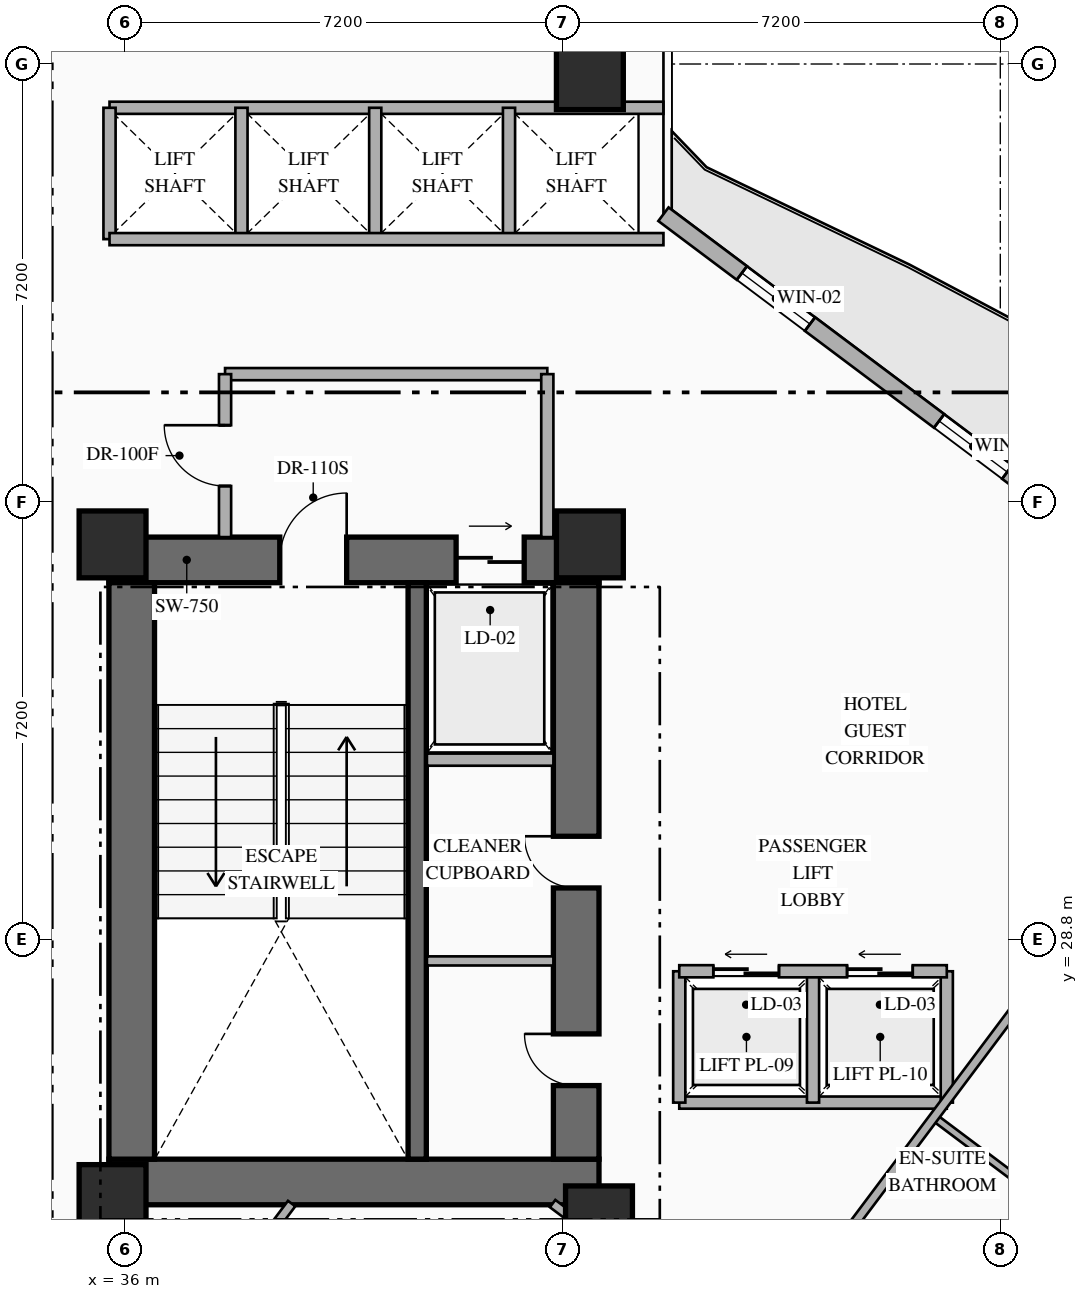
"""IFC4 building model, lengths in metres.
Left out: names, types, materials, properties, quantities, classifications, styles, units other than length and angle.
Written with IfcOpenShell. Run it as: python <this file> out.ifc"""

import sys

from ifc_helpers import new_model, si_unit, direction, frame, frame_2d, origin, origin_2d, place, context, subcontext, project, spatial, rectangle, extrude, element, fill, save


model = new_model("IFC4")
c1 = context("Model", 3, precision=1e-05, world=origin(), true_north=direction((0.0, 1.0)))
c2 = subcontext(c1, "Body", "Model", "MODEL_VIEW")
j1 = project(units=[si_unit("LENGTHUNIT", "METRE"), si_unit("PLANEANGLEUNIT", "RADIAN")], contexts=[c1])
p1 = place(None, origin())
s1 = spatial("IfcSite", under=j1, at=p1, CompositionType="ELEMENT")
p2 = place(p1, origin())
s2 = spatial("IfcBuilding", under=s1, at=p2, CompositionType="ELEMENT")
p3 = place(p2, frame((0.0, 0.0, 77.95)))
s3 = spatial("IfcBuildingStorey", under=s2, at=p3, CompositionType="ELEMENT", Elevation=77.95)
p4 = place(p3, frame((35.74, 24.815, 0.0), z_axis=(0.0, 0.0, 1.0), x_axis=(1.0, 0.0, 0.0)))
e1 = element("IfcWall", 1, at=p4, inside=s3, PredefinedType="SHEAR", context=c2, shape_type="SweptSolid", body=[
    extrude(rectangle(XDim=8.06, YDim=0.75, at=frame_2d((4.03, 0.0))), origin(), (0.0, 0.0, 1.0), 3.35),
])
p5 = place(p3, frame((35.74, 35.045, 0.0), z_axis=(0.0, 0.0, 1.0), x_axis=(1.0, 0.0, 0.0)))
e2 = element("IfcWall", 2, at=p5, inside=s3, PredefinedType="SHEAR", context=c2, shape_type="SweptSolid", body=[
    extrude(rectangle(XDim=8.06, YDim=0.75, at=frame_2d((4.03, 0.0))), origin(), (0.0, 0.0, 1.0), 3.35),
])
p6 = place(p5, frame((2.81, 0.0, 0.0)))
e3 = element("IfcOpeningElement", 3, at=p6, cuts=e2, PredefinedType="OPENING", context=c2, shape_type="SweptSolid", body=[
    extrude(rectangle(XDim=1.1, YDim=2.2, at=frame_2d((0.55, 1.1))), frame((0.0, 0.385, 0.0), z_axis=(0.0, -1.0, 0.0), x_axis=(1.0, 0.0, 0.0)), (0.0, 0.0, 1.0), 0.77),
])
p7 = place(p5, frame((5.71, 0.0, 0.0)))
e4 = element("IfcOpeningElement", 4, at=p7, cuts=e2, PredefinedType="OPENING", context=c2, shape_type="SweptSolid", body=[
    extrude(rectangle(XDim=1.12, YDim=2.15, at=frame_2d((0.56, 1.075))), frame((0.0, 0.385, 0.0), z_axis=(0.0, -1.0, 0.0), x_axis=(1.0, 0.0, 0.0)), (0.0, 0.0, 1.0), 0.77),
])
p8 = place(p3, frame((36.115, 25.19, 0.0), z_axis=(0.0, 0.0, 1.0), x_axis=(0.0, 1.0, 0.0)))
e5 = element("IfcWall", 5, at=p8, inside=s3, PredefinedType="SHEAR", context=c2, shape_type="SweptSolid", body=[
    extrude(rectangle(XDim=9.48, YDim=0.75, at=frame_2d((4.74, 0.0))), origin(), (0.0, 0.0, 1.0), 3.35),
])
p9 = place(p3, frame((43.425, 25.19, 0.0), z_axis=(0.0, 0.0, 1.0), x_axis=(0.0, 1.0, 0.0)))
e6 = element("IfcWall", 6, at=p9, inside=s3, PredefinedType="SHEAR", context=c2, shape_type="SweptSolid", body=[
    extrude(rectangle(XDim=9.48, YDim=0.75, at=frame_2d((4.74, 0.0))), origin(), (0.0, 0.0, 1.0), 3.35),
])
p10 = place(p9, frame((1.21, 0.0, 0.0)))
e7 = element("IfcOpeningElement", 7, at=p10, cuts=e6, PredefinedType="OPENING", context=c2, shape_type="SweptSolid", body=[
    extrude(rectangle(XDim=0.85, YDim=2.08, at=frame_2d((0.425, 1.04))), frame((0.0, 0.385, 0.0), z_axis=(0.0, -1.0, 0.0), x_axis=(1.0, 0.0, 0.0)), (0.0, 0.0, 1.0), 0.77),
])
p11 = place(p9, frame((4.46, 0.0, 0.0)))
e8 = element("IfcOpeningElement", 8, at=p11, cuts=e6, PredefinedType="OPENING", context=c2, shape_type="SweptSolid", body=[
    extrude(rectangle(XDim=0.85, YDim=2.08, at=frame_2d((0.425, 1.04))), frame((0.0, 0.385, 0.0), z_axis=(0.0, -1.0, 0.0), x_axis=(1.0, 0.0, 0.0)), (0.0, 0.0, 1.0), 0.77),
])
p12 = place(p3, frame((40.81, 25.19, 0.0), z_axis=(0.0, 0.0, 1.0), x_axis=(0.0, 1.0, 0.0)))
e9 = element("IfcWall", 9, at=p12, inside=s3, PredefinedType="SHEAR", context=c2, shape_type="SweptSolid", body=[
    extrude(rectangle(XDim=9.48, YDim=0.3, at=frame_2d((4.74, 0.0))), origin(), (0.0, 0.0, 1.0), 3.35),
])
for number, where, z_axis, x_axis in (
    (10, (35.8, 24.55, 0.0), (0.0, 0.0, 1.0), (1.0, 0.0, 0.0)),
    (11, (43.8, 24.2, 0.0), (0.0, 0.0, 1.0), (1.0, 0.0, 0.0)),
    (12, (35.8, 35.3, 0.0), (0.0, 0.0, 1.0), (1.0, 0.0, 0.0)),
    (13, (43.65, 35.3, 0.0), (0.0, 0.0, 1.0), (1.0, 0.0, 0.0)),
    (14, (43.65, 43.0, 0.0), (0.0, 0.0, 1.0), (1.0, 0.0, 0.0)),
):
    element("IfcColumn", number, at=place(p3, frame(where, z_axis=z_axis, x_axis=x_axis)), inside=s3, PredefinedType="COLUMN", context=c2, shape_type="SweptSolid", body=[
        extrude(rectangle(XDim=1.1, YDim=1.1, at=origin_2d()), origin(), (0.0, 0.0, 1.0), 3.35),
    ])
p13 = place(p3, frame((44.86, 40.73, 0.0), z_axis=(0.0, 0.0, 1.0), x_axis=(0.800006902154, -0.599990797017, 0.0)))
e15 = element("IfcWall", 15, at=p13, inside=s3, PredefinedType="STANDARD", context=c2, shape_type="SweptSolid", body=[
    extrude(rectangle(XDim=29.712, YDim=0.28, at=frame_2d((14.856, 0.0))), origin(), (0.0, 0.0, 1.0), 3.13),
])
p14 = place(p13, frame((14.249, 0.0, 0.0)))
e16 = element("IfcOpeningElement", 16, at=p14, cuts=e15, PredefinedType="OPENING", context=c2, shape_type="SweptSolid", body=[
    extrude(rectangle(XDim=1.1, YDim=2.2, at=frame_2d((0.55, 1.1))), frame((0.0, 0.15, 0.0), z_axis=(0.0, -1.0, 0.0), x_axis=(1.0, 0.0, 0.0)), (0.0, 0.0, 1.0), 0.3),
])
p15 = place(p13, frame((1.612, 0.0, 0.85)))
e17 = element("IfcOpeningElement", 17, at=p15, cuts=e15, PredefinedType="OPENING", context=c2, shape_type="SweptSolid", body=[
    extrude(rectangle(XDim=1.4, YDim=1.8, at=frame_2d((0.7, 0.9))), frame((0.0, 0.15, 0.0), z_axis=(0.0, -1.0, 0.0), x_axis=(1.0, 0.0, 0.0)), (0.0, 0.0, 1.0), 0.3),
])
p16 = place(p13, frame((5.667, 0.0, 0.85)))
e18 = element("IfcOpeningElement", 18, at=p16, cuts=e15, PredefinedType="OPENING", context=c2, shape_type="SweptSolid", body=[
    extrude(rectangle(XDim=1.4, YDim=1.8, at=frame_2d((0.7, 0.9))), frame((0.0, 0.15, 0.0), z_axis=(0.0, -1.0, 0.0), x_axis=(1.0, 0.0, 0.0)), (0.0, 0.0, 1.0), 0.3),
])
p17 = place(p13, frame((9.912, 0.0, 0.85)))
e19 = element("IfcOpeningElement", 19, at=p17, cuts=e15, PredefinedType="OPENING", context=c2, shape_type="SweptSolid", body=[
    extrude(rectangle(XDim=1.4, YDim=1.8, at=frame_2d((0.7, 0.9))), frame((0.0, 0.15, 0.0), z_axis=(0.0, -1.0, 0.0), x_axis=(1.0, 0.0, 0.0)), (0.0, 0.0, 1.0), 0.3),
])
p18 = place(p13, frame((19.743, 0.0, 0.85)))
e20 = element("IfcOpeningElement", 20, at=p18, cuts=e15, PredefinedType="OPENING", context=c2, shape_type="SweptSolid", body=[
    extrude(rectangle(XDim=1.4, YDim=1.8, at=frame_2d((0.7, 0.9))), frame((0.0, 0.15, 0.0), z_axis=(0.0, -1.0, 0.0), x_axis=(1.0, 0.0, 0.0)), (0.0, 0.0, 1.0), 0.3),
])
p19 = place(p13, frame((22.645, 0.0, 0.85)))
e21 = element("IfcOpeningElement", 21, at=p19, cuts=e15, PredefinedType="OPENING", context=c2, shape_type="SweptSolid", body=[
    extrude(rectangle(XDim=1.4, YDim=1.8, at=frame_2d((0.7, 0.9))), frame((0.0, 0.15, 0.0), z_axis=(0.0, -1.0, 0.0), x_axis=(1.0, 0.0, 0.0)), (0.0, 0.0, 1.0), 0.3),
])
p20 = place(p13, frame((26.7, 0.0, 0.85)))
e22 = element("IfcOpeningElement", 22, at=p20, cuts=e15, PredefinedType="OPENING", context=c2, shape_type="SweptSolid", body=[
    extrude(rectangle(XDim=1.4, YDim=1.8, at=frame_2d((0.7, 0.9))), frame((0.0, 0.15, 0.0), z_axis=(0.0, -1.0, 0.0), x_axis=(1.0, 0.0, 0.0)), (0.0, 0.0, 1.0), 0.3),
])
p21 = place(p3, frame((40.97, 31.76, 0.0), z_axis=(0.0, 0.0, 1.0), x_axis=(1.0, 0.0, 0.0)))
e23 = element("IfcWall", 23, at=p21, inside=s3, PredefinedType="STANDARD", context=c2, shape_type="SweptSolid", body=[
    extrude(rectangle(XDim=2.08, YDim=0.2, at=frame_2d((1.04, 0.0))), origin(), (0.0, 0.0, 1.0), 3.13),
])
p22 = place(p3, frame((40.97, 28.45, 0.0), z_axis=(0.0, 0.0, 1.0), x_axis=(1.0, 0.0, 0.0)))
e24 = element("IfcWall", 24, at=p22, inside=s3, PredefinedType="PARTITIONING", context=c2, shape_type="SweptSolid", body=[
    extrude(rectangle(XDim=2.08, YDim=0.15, at=frame_2d((1.04, 0.0))), origin(), (0.0, 0.0, 1.0), 3.13),
])
p23 = place(p3, frame((37.65, 38.1, 0.0), z_axis=(0.0, 0.0, 1.0), x_axis=(1.0, 0.0, 0.0)))
e25 = element("IfcWall", 25, at=p23, inside=s3, PredefinedType="STANDARD", context=c2, shape_type="SweptSolid", body=[
    extrude(rectangle(XDim=5.3, YDim=0.2, at=frame_2d((2.65, 0.0))), origin(), (0.0, 0.0, 1.0), 3.13),
])
p24 = place(p3, frame((42.95, 35.42, 0.0), z_axis=(0.0, 0.0, 1.0), x_axis=(0.0, 1.0, 0.0)))
e26 = element("IfcWall", 26, at=p24, inside=s3, PredefinedType="STANDARD", context=c2, shape_type="SweptSolid", body=[
    extrude(rectangle(XDim=2.68, YDim=0.2, at=frame_2d((1.34, 0.0))), origin(), (0.0, 0.0, 1.0), 3.13),
])
p25 = place(p3, frame((37.65, 35.42, 0.0), z_axis=(0.0, 0.0, 1.0), x_axis=(0.0, 1.0, 0.0)))
e27 = element("IfcWall", 27, at=p25, inside=s3, PredefinedType="STANDARD", context=c2, shape_type="SweptSolid", body=[
    extrude(rectangle(XDim=2.68, YDim=0.2, at=frame_2d((1.34, 0.0))), origin(), (0.0, 0.0, 1.0), 3.13),
])
p26 = place(p25, frame((0.84, 0.0, 0.0)))
e28 = element("IfcOpeningElement", 28, at=p26, cuts=e27, PredefinedType="OPENING", context=c2, shape_type="SweptSolid", body=[
    extrude(rectangle(XDim=1.0, YDim=2.2, at=frame_2d((0.5, 1.1))), frame((0.0, 0.11, 0.0), z_axis=(0.0, -1.0, 0.0), x_axis=(1.0, 0.0, 0.0)), (0.0, 0.0, 1.0), 0.22),
])
p27 = place(p3, frame((35.75, 42.48, 0.0), z_axis=(0.0, 0.0, 1.0), x_axis=(1.0, 0.0, 0.0)))
e29 = element("IfcWall", 29, at=p27, inside=s3, PredefinedType="STANDARD", context=c2, shape_type="SweptSolid", body=[
    extrude(rectangle(XDim=9.11, YDim=0.2, at=frame_2d((4.555, 0.0))), origin(), (0.0, 0.0, 1.0), 3.13),
])
for number, where, z_axis, x_axis in (
    (30, (35.75, 40.32, 0.0), (0.0, 0.0, 1.0), (0.0, 1.0, 0.0)),
    (31, (37.92, 40.32, 0.0), (0.0, 0.0, 1.0), (0.0, 1.0, 0.0)),
    (32, (40.12, 40.32, 0.0), (0.0, 0.0, 1.0), (0.0, 1.0, 0.0)),
    (33, (42.32, 40.32, 0.0), (0.0, 0.0, 1.0), (0.0, 1.0, 0.0)),
):
    element("IfcWall", number, at=place(p3, frame(where, z_axis=z_axis, x_axis=x_axis)), inside=s3, PredefinedType="STANDARD", context=c2, shape_type="SweptSolid", body=[
        extrude(rectangle(XDim=2.16, YDim=0.2, at=frame_2d((1.08, 0.0))), origin(), (0.0, 0.0, 1.0), 3.13),
    ])
p28 = place(p3, frame((35.75, 40.32, 0.0), z_axis=(0.0, 0.0, 1.0), x_axis=(1.0, 0.0, 0.0)))
e34 = element("IfcWall", 34, at=p28, inside=s3, PredefinedType="STANDARD", context=c2, shape_type="SweptSolid", body=[
    extrude(rectangle(XDim=9.11, YDim=0.2, at=frame_2d((4.555, 0.0))), origin(), (0.0, 0.0, 1.0), 3.13),
])
p29 = place(p3, frame((45.12, 26.12, 0.0), z_axis=(0.0, 0.0, 1.0), x_axis=(1.0, 0.0, 0.0)))
e35 = element("IfcWall", 35, at=p29, inside=s3, PredefinedType="STANDARD", context=c2, shape_type="SweptSolid", body=[
    extrude(rectangle(XDim=4.4, YDim=0.2, at=frame_2d((2.2, 0.0))), origin(), (0.0, 0.0, 1.0), 3.13),
])
for number, where, z_axis, x_axis in (
    (36, (45.12, 26.12, 0.0), (0.0, 0.0, 1.0), (0.0, 1.0, 0.0)),
    (37, (49.52, 26.12, 0.0), (0.0, 0.0, 1.0), (0.0, 1.0, 0.0)),
    (38, (47.32, 26.12, 0.0), (0.0, 0.0, 1.0), (0.0, 1.0, 0.0)),
):
    element("IfcWall", number, at=place(p3, frame(where, z_axis=z_axis, x_axis=x_axis)), inside=s3, PredefinedType="STANDARD", context=c2, shape_type="SweptSolid", body=[
        extrude(rectangle(XDim=2.16, YDim=0.2, at=frame_2d((1.08, 0.0))), origin(), (0.0, 0.0, 1.0), 3.13),
    ])
p30 = place(p3, frame((45.12, 28.28, 0.0), z_axis=(0.0, 0.0, 1.0), x_axis=(1.0, 0.0, 0.0)))
e39 = element("IfcWall", 39, at=p30, inside=s3, PredefinedType="STANDARD", context=c2, shape_type="SweptSolid", body=[
    extrude(rectangle(XDim=4.4, YDim=0.2, at=frame_2d((2.2, 0.0))), origin(), (0.0, 0.0, 1.0), 3.13),
])
p31 = place(p30, frame((0.56, 0.0, 0.0)))
e40 = element("IfcOpeningElement", 40, at=p31, cuts=e39, PredefinedType="OPENING", context=c2, shape_type="SweptSolid", body=[
    extrude(rectangle(XDim=1.08, YDim=2.15, at=frame_2d((0.54, 1.075))), frame((0.0, 0.11, 0.0), z_axis=(0.0, -1.0, 0.0), x_axis=(1.0, 0.0, 0.0)), (0.0, 0.0, 1.0), 0.22),
])
p32 = place(p30, frame((2.76, 0.0, 0.0)))
e41 = element("IfcOpeningElement", 41, at=p32, cuts=e39, PredefinedType="OPENING", context=c2, shape_type="SweptSolid", body=[
    extrude(rectangle(XDim=1.08, YDim=2.15, at=frame_2d((0.54, 1.075))), frame((0.0, 0.11, 0.0), z_axis=(0.0, -1.0, 0.0), x_axis=(1.0, 0.0, 0.0)), (0.0, 0.0, 1.0), 0.22),
])
p33 = place(p3, frame((43.037, 24.46, 0.0), z_axis=(0.0, 0.0, 1.0), x_axis=(0.799971872363, -0.600037501685, 0.0)))
e42 = element("IfcWall", 42, at=p33, inside=s3, PredefinedType="PARTITIONING", context=c2, shape_type="SweptSolid", body=[
    extrude(rectangle(XDim=4.167, YDim=0.15, at=frame_2d((2.083, 0.0))), origin(), (0.0, 0.0, 1.0), 2.425),
])
p34 = place(p33, frame((2.468, 0.0, 0.0)))
e43 = element("IfcOpeningElement", 43, at=p34, cuts=e42, PredefinedType="OPENING", context=c2, shape_type="SweptSolid", body=[
    extrude(rectangle(XDim=0.95, YDim=2.15, at=frame_2d((0.475, 1.075))), frame((0.0, 0.085, 0.0), z_axis=(0.0, -1.0, 0.0), x_axis=(1.0, 0.0, 0.0)), (0.0, 0.0, 1.0), 0.17),
])
p35 = place(p3, frame((33.384, 17.312, 0.0), z_axis=(0.0, 0.0, 1.0), x_axis=(0.600008743659, 0.799993442181, 0.0)))
e44 = element("IfcWall", 44, at=p35, inside=s3, PredefinedType="PARTITIONING", context=c2, shape_type="SweptSolid", body=[
    extrude(rectangle(XDim=8.935, YDim=0.15, at=frame_2d((4.468, 0.0))), origin(), (0.0, 0.0, 1.0), 3.13),
])
p36 = place(p3, frame((49.59, 22.67, 0.0), z_axis=(0.0, 0.0, 1.0), x_axis=(0.599951172744, 0.800036618114, 0.0)))
e45 = element("IfcWall", 45, at=p36, inside=s3, PredefinedType="PARTITIONING", context=c2, shape_type="SweptSolid", body=[
    extrude(rectangle(XDim=2.4, YDim=0.12, at=frame_2d((1.2, 0.0))), origin(), (0.0, 0.0, 1.0), 3.13),
])
p37 = place(p36, frame((0.8, 0.0, 0.0)))
e46 = element("IfcOpeningElement", 46, at=p37, cuts=e45, PredefinedType="OPENING", context=c2, shape_type="SweptSolid", body=[
    extrude(rectangle(XDim=0.8, YDim=2.06, at=frame_2d((0.4, 1.03))), frame((0.0, 0.07, 0.0), z_axis=(0.0, -1.0, 0.0), x_axis=(1.0, 0.0, 0.0)), (0.0, 0.0, 1.0), 0.14),
])
p38 = place(p3, frame((49.31, 25.88, 0.0), z_axis=(0.0, 0.0, 1.0), x_axis=(0.800040880289, -0.59994548908, 0.0)))
e47 = element("IfcWall", 47, at=p38, inside=s3, PredefinedType="PARTITIONING", context=c2, shape_type="SweptSolid", body=[
    extrude(rectangle(XDim=2.15, YDim=0.12, at=frame_2d((1.075, 0.0))), origin(), (0.0, 0.0, 1.0), 3.13),
])
p39 = place(p3, frame((47.87, 23.96, 0.0), z_axis=(0.0, 0.0, 1.0), x_axis=(0.599996617946, 0.80000253653, 0.0)))
e48 = element("IfcWall", 48, at=p39, inside=s3, PredefinedType="PARTITIONING", context=c2, shape_type="SweptSolid", body=[
    extrude(rectangle(XDim=11.55, YDim=0.15, at=frame_2d((5.775, 0.0))), origin(), (0.0, 0.0, 1.0), 3.13),
])
p40 = place(p15, origin())
e49 = element("IfcWindow", 49, at=p40, inside=s3, PartitioningType="SINGLE_PANEL", PredefinedType="WINDOW", context=c2, shape_type="SweptSolid", body=[
    extrude(rectangle(XDim=1.4, YDim=1.8, at=frame_2d((0.7, 0.9))), frame((0.0, 0.03, 0.0), z_axis=(0.0, -1.0, 0.0), x_axis=(1.0, 0.0, 0.0)), (0.0, 0.0, 1.0), 0.06),
])
fill(e17, e49)
p41 = place(p16, origin())
e50 = element("IfcWindow", 50, at=p41, inside=s3, PartitioningType="SINGLE_PANEL", PredefinedType="WINDOW", context=c2, shape_type="SweptSolid", body=[
    extrude(rectangle(XDim=1.4, YDim=1.8, at=frame_2d((0.7, 0.9))), frame((0.0, 0.03, 0.0), z_axis=(0.0, -1.0, 0.0), x_axis=(1.0, 0.0, 0.0)), (0.0, 0.0, 1.0), 0.06),
])
fill(e18, e50)
p42 = place(p6, origin())
e51 = element("IfcDoor", 51, at=p42, inside=s3, OperationType="SINGLE_SWING_RIGHT", PredefinedType="DOOR", context=c2, shape_type="SweptSolid", body=[
    extrude(rectangle(XDim=1.1, YDim=2.2, at=frame_2d((0.55, 1.1))), frame((0.0, 0.025, 0.0), z_axis=(0.0, -1.0, 0.0), x_axis=(1.0, 0.0, 0.0)), (0.0, 0.0, 1.0), 0.05),
])
fill(e3, e51)
p43 = place(p7, origin())
e52 = element("IfcDoor", 52, at=p43, inside=s3, OperationType="SLIDING_TO_RIGHT", PredefinedType="USERDEFINED", context=c2, shape_type="SweptSolid", body=[
    extrude(rectangle(XDim=1.12, YDim=2.15, at=frame_2d((0.56, 1.075))), frame((0.0, 0.025, 0.0), z_axis=(0.0, -1.0, 0.0), x_axis=(1.0, 0.0, 0.0)), (0.0, 0.0, 1.0), 0.05),
])
fill(e4, e52)
p44 = place(p10, origin())
e53 = element("IfcDoor", 53, at=p44, inside=s3, OperationType="SINGLE_SWING_RIGHT", PredefinedType="DOOR", context=c2, shape_type="SweptSolid", body=[
    extrude(rectangle(XDim=0.85, YDim=2.08, at=frame_2d((0.425, 1.04))), frame((0.0, 0.025, 0.0), z_axis=(0.0, -1.0, 0.0), x_axis=(1.0, 0.0, 0.0)), (0.0, 0.0, 1.0), 0.05),
])
fill(e7, e53)
p45 = place(p11, origin())
e54 = element("IfcDoor", 54, at=p45, inside=s3, OperationType="SINGLE_SWING_RIGHT", PredefinedType="DOOR", context=c2, shape_type="SweptSolid", body=[
    extrude(rectangle(XDim=0.85, YDim=2.08, at=frame_2d((0.425, 1.04))), frame((0.0, 0.025, 0.0), z_axis=(0.0, -1.0, 0.0), x_axis=(1.0, 0.0, 0.0)), (0.0, 0.0, 1.0), 0.05),
])
fill(e8, e54)
p46 = place(p26, origin())
e55 = element("IfcDoor", 55, at=p46, inside=s3, OperationType="SINGLE_SWING_RIGHT", PredefinedType="DOOR", context=c2, shape_type="SweptSolid", body=[
    extrude(rectangle(XDim=1.0, YDim=2.2, at=frame_2d((0.5, 1.1))), frame((0.0, 0.025, 0.0), z_axis=(0.0, -1.0, 0.0), x_axis=(1.0, 0.0, 0.0)), (0.0, 0.0, 1.0), 0.05),
])
fill(e28, e55)
p47 = place(p31, origin())
e56 = element("IfcDoor", 56, at=p47, inside=s3, OperationType="SLIDING_TO_LEFT", PredefinedType="USERDEFINED", context=c2, shape_type="SweptSolid", body=[
    extrude(rectangle(XDim=1.08, YDim=2.15, at=frame_2d((0.54, 1.075))), frame((0.0, 0.025, 0.0), z_axis=(0.0, -1.0, 0.0), x_axis=(1.0, 0.0, 0.0)), (0.0, 0.0, 1.0), 0.05),
])
fill(e40, e56)
p48 = place(p32, origin())
e57 = element("IfcDoor", 57, at=p48, inside=s3, OperationType="SLIDING_TO_LEFT", PredefinedType="USERDEFINED", context=c2, shape_type="SweptSolid", body=[
    extrude(rectangle(XDim=1.08, YDim=2.15, at=frame_2d((0.54, 1.075))), frame((0.0, 0.025, 0.0), z_axis=(0.0, -1.0, 0.0), x_axis=(1.0, 0.0, 0.0)), (0.0, 0.0, 1.0), 0.05),
])
fill(e41, e57)
save(model, sys.argv[1])
